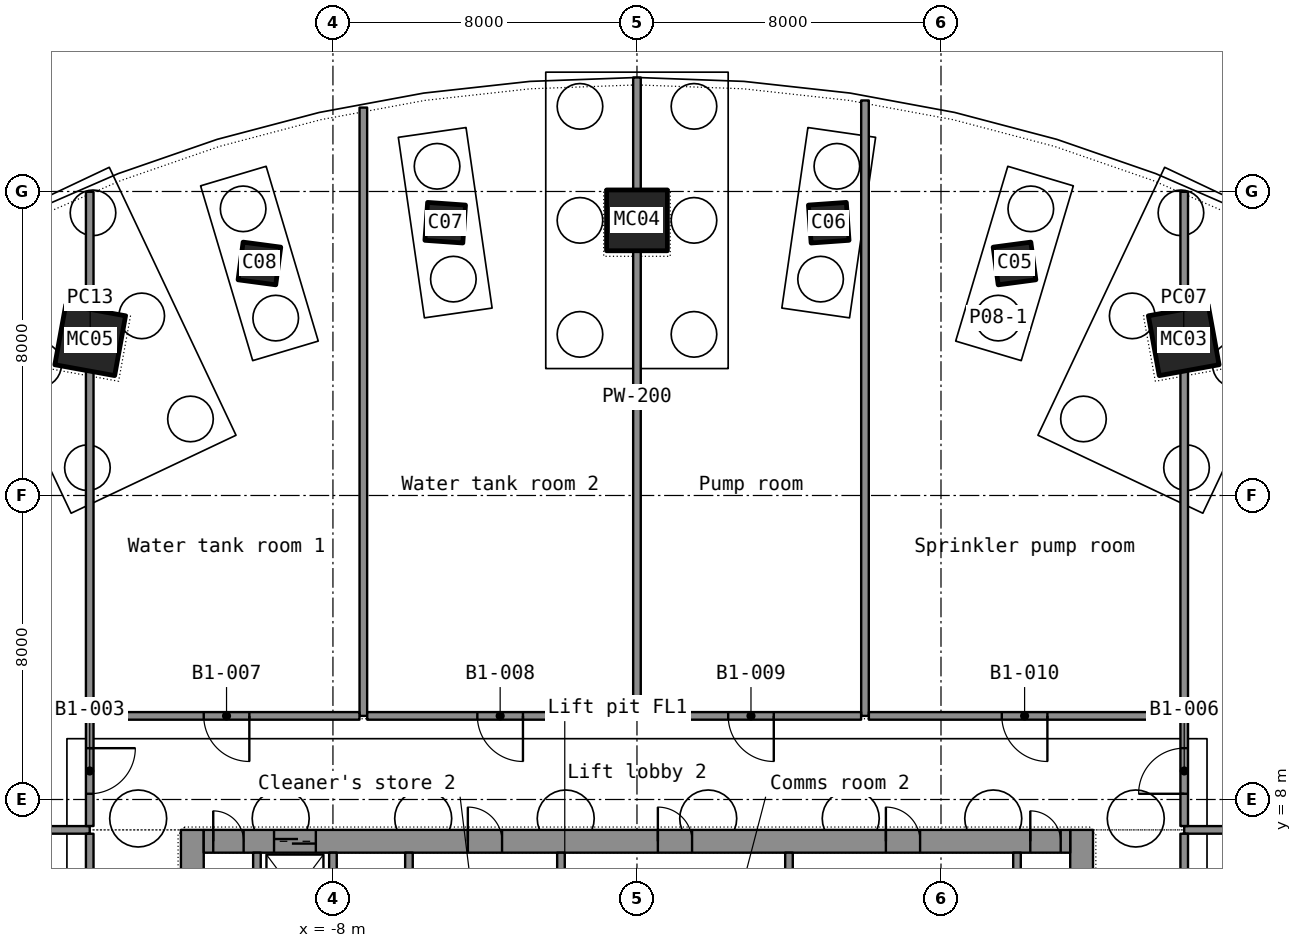
"""IFC4 building model, lengths in metres.
Left out: names, types, materials, properties, quantities, classifications, styles, units other than length and angle.
Written with IfcOpenShell. Run it as: python <this file> out.ifc"""

import sys

from ifc_helpers import new_model, si_unit, direction, frame, frame_2d, origin, origin_2d, place, context, subcontext, project, spatial, rectangle, hollow_rectangle, extrude, element, fill, save


model = new_model("IFC4")
c1 = context("Model", 3, precision=1e-05, world=origin(), true_north=direction((0.0, 1.0)))
c2 = subcontext(c1, "Body", "Model", "MODEL_VIEW")
j1 = project(units=[si_unit("LENGTHUNIT", "METRE"), si_unit("PLANEANGLEUNIT", "RADIAN")], contexts=[c1])
p1 = place(None, origin())
s1 = spatial("IfcSite", under=j1, at=p1, CompositionType="ELEMENT")
p2 = place(p1, origin())
s2 = spatial("IfcBuilding", under=s1, at=p2, CompositionType="ELEMENT")
p3 = place(p2, frame((0.0, 0.0, -5.0)))
s3 = spatial("IfcBuildingStorey", under=s2, at=p3, CompositionType="ELEMENT", Elevation=-5.0)
p4 = place(p3, frame((14.387, 20.085, 0.0), z_axis=(-0.017326178, -0.02450068, 0.999549659), x_axis=(0.906542435, -0.422080558, 0.005368072)))
e1 = element("IfcColumn", 1, at=p4, inside=s3, PredefinedType="COLUMN", context=c2, shape_type="SweptSolid", body=[
    extrude(hollow_rectangle(XDim=1.6, YDim=1.6, WallThickness=0.04, at=origin_2d()), origin(), (0.0, 0.0, 1.0), 5.002),
])
p5 = place(p3, frame((9.935, 22.106, 0.0), z_axis=(-0.011860186, -0.026648812, 0.999574498), x_axis=(0.959327102, -0.282270497, 0.003857265)))
e2 = element("IfcColumn", 2, at=p5, inside=s3, PredefinedType="COLUMN", context=c2, shape_type="SweptSolid", body=[
    extrude(hollow_rectangle(XDim=1.0, YDim=1.0, WallThickness=0.032, at=origin_2d()), origin(), (0.0, 0.0, 1.0), 5.002),
])
p6 = place(p3, frame((5.046, 23.179, 0.0), z_axis=(-0.00600341, -0.027918297, 0.999592181), x_axis=(0.990084374, -0.140459386, 0.002023321)))
e3 = element("IfcColumn", 3, at=p6, inside=s3, PredefinedType="COLUMN", context=c2, shape_type="SweptSolid", body=[
    extrude(hollow_rectangle(XDim=1.0, YDim=1.0, WallThickness=0.032, at=origin_2d()), origin(), (0.0, 0.0, 1.0), 5.002),
])
p7 = place(p3, frame((0.0, 23.24, 0.0), z_axis=(0.0, -0.028357732, 0.999597839), x_axis=(1.0, 0.0, 0.0)))
e4 = element("IfcColumn", 4, at=p7, inside=s3, PredefinedType="COLUMN", context=c2, shape_type="SweptSolid", body=[
    extrude(hollow_rectangle(XDim=1.6, YDim=1.6, WallThickness=0.04, at=origin_2d()), origin(), (0.0, 0.0, 1.0), 5.002),
])
p8 = place(p3, frame((-5.046, 23.179, 0.0), z_axis=(0.00600341, -0.027918297, 0.999592181), x_axis=(0.990084374, 0.140459386, -0.002023321)))
e5 = element("IfcColumn", 5, at=p8, inside=s3, PredefinedType="COLUMN", context=c2, shape_type="SweptSolid", body=[
    extrude(hollow_rectangle(XDim=1.0, YDim=1.0, WallThickness=0.032, at=origin_2d()), origin(), (0.0, 0.0, 1.0), 5.002),
])
p9 = place(p3, frame((-9.935, 22.106, 0.0), z_axis=(0.011860186, -0.026648812, 0.999574498), x_axis=(0.959327102, 0.282270497, -0.003857265)))
e6 = element("IfcColumn", 6, at=p9, inside=s3, PredefinedType="COLUMN", context=c2, shape_type="SweptSolid", body=[
    extrude(hollow_rectangle(XDim=1.0, YDim=1.0, WallThickness=0.032, at=origin_2d()), origin(), (0.0, 0.0, 1.0), 5.002),
])
p10 = place(p3, frame((-14.387, 20.085, 0.0), z_axis=(0.017326178, -0.02450068, 0.999549659), x_axis=(0.906542435, 0.422080558, -0.005368072)))
e7 = element("IfcColumn", 7, at=p10, inside=s3, PredefinedType="COLUMN", context=c2, shape_type="SweptSolid", body=[
    extrude(hollow_rectangle(XDim=1.6, YDim=1.6, WallThickness=0.04, at=origin_2d()), origin(), (0.0, 0.0, 1.0), 5.002),
])
p11 = place(p3, frame((-11.7, -7.2, 0.0), z_axis=(0.0, 0.0, 1.0), x_axis=(0.0, 1.0, 0.0)))
e8 = element("IfcWall", 8, at=p11, inside=s3, PredefinedType="SHEAR", context=c2, shape_type="SweptSolid", body=[
    extrude(rectangle(XDim=14.4, YDim=0.6, at=frame_2d((7.2, 0.0))), origin(), (0.0, 0.0, 1.0), 4.6),
])
p12 = place(p11, frame((6.5, 0.0, 0.0)))
e9 = element("IfcOpeningElement", 9, at=p12, cuts=e8, PredefinedType="OPENING", context=c2, shape_type="SweptSolid", body=[
    extrude(rectangle(XDim=1.4, YDim=2.2, at=frame_2d((0.7, 1.1))), frame((0.0, 0.31, 0.0), z_axis=(0.0, -1.0, 0.0), x_axis=(1.0, 0.0, 0.0)), (0.0, 0.0, 1.0), 0.62),
])
p13 = place(p3, frame((11.7, -7.2, 0.0), z_axis=(0.0, 0.0, 1.0), x_axis=(0.0, 1.0, 0.0)))
e10 = element("IfcWall", 10, at=p13, inside=s3, PredefinedType="SHEAR", context=c2, shape_type="SweptSolid", body=[
    extrude(rectangle(XDim=14.4, YDim=0.6, at=frame_2d((7.2, 0.0))), origin(), (0.0, 0.0, 1.0), 4.6),
])
p14 = place(p13, frame((6.5, 0.0, 0.0)))
e11 = element("IfcOpeningElement", 11, at=p14, cuts=e10, PredefinedType="OPENING", context=c2, shape_type="SweptSolid", body=[
    extrude(rectangle(XDim=1.4, YDim=2.2, at=frame_2d((0.7, 1.1))), frame((0.0, 0.31, 0.0), z_axis=(0.0, -1.0, 0.0), x_axis=(1.0, 0.0, 0.0)), (0.0, 0.0, 1.0), 0.62),
])
p15 = place(p3, frame((-11.4, 6.9, 0.0), z_axis=(0.0, 0.0, 1.0), x_axis=(1.0, 0.0, 0.0)))
e12 = element("IfcWall", 12, at=p15, inside=s3, PredefinedType="SHEAR", context=c2, shape_type="SweptSolid", body=[
    extrude(rectangle(XDim=22.8, YDim=0.6, at=frame_2d((11.4, 0.0))), origin(), (0.0, 0.0, 1.0), 4.6),
])
p16 = place(p15, frame((1.85, 0.0, 0.0)))
e13 = element("IfcOpeningElement", 13, at=p16, cuts=e12, PredefinedType="OPENING", context=c2, shape_type="SweptSolid", body=[
    extrude(rectangle(XDim=1.1, YDim=2.2, at=frame_2d((0.55, 1.1))), frame((0.0, 0.31, 0.0), z_axis=(0.0, -1.0, 0.0), x_axis=(1.0, 0.0, 0.0)), (0.0, 0.0, 1.0), 0.62),
])
p17 = place(p15, frame((6.95, 0.0, 0.0)))
e14 = element("IfcOpeningElement", 14, at=p17, cuts=e12, PredefinedType="OPENING", context=c2, shape_type="SweptSolid", body=[
    extrude(rectangle(XDim=0.9, YDim=2.1, at=frame_2d((0.45, 1.05))), frame((0.0, 0.31, 0.0), z_axis=(0.0, -1.0, 0.0), x_axis=(1.0, 0.0, 0.0)), (0.0, 0.0, 1.0), 0.62),
])
p18 = place(p15, frame((11.95, 0.0, 0.0)))
e15 = element("IfcOpeningElement", 15, at=p18, cuts=e12, PredefinedType="OPENING", context=c2, shape_type="SweptSolid", body=[
    extrude(rectangle(XDim=0.9, YDim=2.1, at=frame_2d((0.45, 1.05))), frame((0.0, 0.31, 0.0), z_axis=(0.0, -1.0, 0.0), x_axis=(1.0, 0.0, 0.0)), (0.0, 0.0, 1.0), 0.62),
])
p19 = place(p15, frame((17.95, 0.0, 0.0)))
e16 = element("IfcOpeningElement", 16, at=p19, cuts=e12, PredefinedType="OPENING", context=c2, shape_type="SweptSolid", body=[
    extrude(rectangle(XDim=0.9, YDim=2.1, at=frame_2d((0.45, 1.05))), frame((0.0, 0.31, 0.0), z_axis=(0.0, -1.0, 0.0), x_axis=(1.0, 0.0, 0.0)), (0.0, 0.0, 1.0), 0.62),
])
p20 = place(p15, frame((0.25, 0.0, 0.0)))
e17 = element("IfcOpeningElement", 17, at=p20, cuts=e12, PredefinedType="OPENING", context=c2, shape_type="SweptSolid", body=[
    extrude(rectangle(XDim=0.8, YDim=2.05, at=frame_2d((0.4, 1.025))), frame((0.0, 0.31, 0.0), z_axis=(0.0, -1.0, 0.0), x_axis=(1.0, 0.0, 0.0)), (0.0, 0.0, 1.0), 0.62),
])
p21 = place(p15, frame((21.75, 0.0, 0.0)))
e18 = element("IfcOpeningElement", 18, at=p21, cuts=e12, PredefinedType="OPENING", context=c2, shape_type="SweptSolid", body=[
    extrude(rectangle(XDim=0.8, YDim=2.05, at=frame_2d((0.4, 1.025))), frame((0.0, 0.31, 0.0), z_axis=(0.0, -1.0, 0.0), x_axis=(1.0, 0.0, 0.0)), (0.0, 0.0, 1.0), 0.62),
])
for number, where, z_axis, x_axis in (
    (19, (-10.0, 3.9, 0.0), (0.0, 0.0, 1.0), (0.0, 1.0, 0.0)),
    (20, (-8.0, 3.9, 0.0), (0.0, 0.0, 1.0), (0.0, 1.0, 0.0)),
    (21, (-6.0, 3.9, 0.0), (0.0, 0.0, 1.0), (0.0, 1.0, 0.0)),
    (22, (10.0, 3.9, 0.0), (0.0, 0.0, 1.0), (0.0, 1.0, 0.0)),
):
    element("IfcWall", number, at=place(p3, frame(where, z_axis=z_axis, x_axis=x_axis)), inside=s3, PredefinedType="SHEAR", context=c2, shape_type="SweptSolid", body=[
        extrude(rectangle(XDim=2.7, YDim=0.2, at=frame_2d((1.35, 0.0))), origin(), (0.0, 0.0, 1.0), 4.6),
    ])
for number, where, z_axis, x_axis in (
    (23, (-2.0, 3.9, 0.0), (0.0, 0.0, 1.0), (0.0, 1.0, 0.0)),
    (24, (4.0, 3.9, 0.0), (0.0, 0.0, 1.0), (0.0, 1.0, 0.0)),
):
    element("IfcWall", number, at=place(p3, frame(where, z_axis=z_axis, x_axis=x_axis)), inside=s3, PredefinedType="PARTITIONING", context=c2, shape_type="SweptSolid", body=[
        extrude(rectangle(XDim=2.7, YDim=0.2, at=frame_2d((1.35, 0.0))), origin(), (0.0, 0.0, 1.0), 4.6),
    ])
p22 = place(p3, frame((0.0, 10.2, 0.0), z_axis=(0.0, 0.0, 1.0), x_axis=(0.0, 1.0, 0.0)))
e25 = element("IfcWall", 25, at=p22, inside=s3, PredefinedType="PARTITIONING", context=c2, shape_type="SweptSolid", body=[
    extrude(rectangle(XDim=16.8, YDim=0.2, at=frame_2d((8.4, 0.0))), origin(), (0.0, 0.0, 1.0), 3.6),
])
for number, where, z_axis, x_axis in (
    (26, (-14.4, 7.2, 0.0), (0.0, 0.0, 1.0), (-1.0, 0.0, 0.0)),
    (27, (31.1, 7.2, 0.0), (0.0, 0.0, 1.0), (-1.0, 0.0, 0.0)),
):
    element("IfcWall", number, at=place(p3, frame(where, z_axis=z_axis, x_axis=x_axis)), inside=s3, PredefinedType="PARTITIONING", context=c2, shape_type="SweptSolid", body=[
        extrude(rectangle(XDim=16.7, YDim=0.2, at=frame_2d((8.35, 0.0))), origin(), (0.0, 0.0, 1.0), 3.6),
    ])
p23 = place(p3, frame((6.0, 10.2, 0.0), z_axis=(0.0, 0.0, 1.0), x_axis=(0.0, 1.0, 0.0)))
e28 = element("IfcWall", 28, at=p23, inside=s3, PredefinedType="PARTITIONING", context=c2, shape_type="SweptSolid", body=[
    extrude(rectangle(XDim=16.196, YDim=0.2, at=frame_2d((8.098, 0.0))), origin(), (0.0, 0.0, 1.0), 3.6),
])
p24 = place(p3, frame((-7.2, 10.2, 0.0), z_axis=(0.0, 0.0, 1.0), x_axis=(0.0, 1.0, 0.0)))
e29 = element("IfcWall", 29, at=p24, inside=s3, PredefinedType="PARTITIONING", context=c2, shape_type="SweptSolid", body=[
    extrude(rectangle(XDim=16.008, YDim=0.2, at=frame_2d((8.004, 0.0))), origin(), (0.0, 0.0, 1.0), 3.6),
])
p25 = place(p3, frame((-14.4, 7.098, 0.0), z_axis=(0.0, 0.0, 1.0), x_axis=(0.0, -1.0, 0.0)))
e30 = element("IfcWall", 30, at=p25, inside=s3, PredefinedType="PARTITIONING", context=c2, shape_type="SweptSolid", body=[
    extrude(rectangle(XDim=14.196, YDim=0.2, at=frame_2d((7.098, 0.0))), origin(), (0.0, 0.0, 1.0), 3.6),
])
p26 = place(p25, frame((6.498, 0.0, 0.0)))
e31 = element("IfcOpeningElement", 31, at=p26, cuts=e30, PredefinedType="OPENING", context=c2, shape_type="SweptSolid", body=[
    extrude(rectangle(XDim=1.2, YDim=2.2, at=frame_2d((0.6, 1.1))), frame((0.0, 0.11, 0.0), z_axis=(0.0, -1.0, 0.0), x_axis=(1.0, 0.0, 0.0)), (0.0, 0.0, 1.0), 0.22),
])
p27 = place(p3, frame((14.4, -7.098, 0.0), z_axis=(0.0, 0.0, 1.0), x_axis=(0.0, 1.0, 0.0)))
e32 = element("IfcWall", 32, at=p27, inside=s3, PredefinedType="PARTITIONING", context=c2, shape_type="SweptSolid", body=[
    extrude(rectangle(XDim=14.196, YDim=0.2, at=frame_2d((7.098, 0.0))), origin(), (0.0, 0.0, 1.0), 3.6),
])
p28 = place(p27, frame((6.498, 0.0, 0.0)))
e33 = element("IfcOpeningElement", 33, at=p28, cuts=e32, PredefinedType="OPENING", context=c2, shape_type="SweptSolid", body=[
    extrude(rectangle(XDim=1.2, YDim=2.2, at=frame_2d((0.6, 1.1))), frame((0.0, 0.11, 0.0), z_axis=(0.0, -1.0, 0.0), x_axis=(1.0, 0.0, 0.0)), (0.0, 0.0, 1.0), 0.22),
])
for number, where, z_axis, x_axis in (
    (34, (-14.4, 10.2, 0.0), (0.0, 0.0, 1.0), (0.0, 1.0, 0.0)),
    (35, (14.4, 23.991, 0.0), (0.0, 0.0, 1.0), (0.0, -1.0, 0.0)),
):
    element("IfcWall", number, at=place(p3, frame(where, z_axis=z_axis, x_axis=x_axis)), inside=s3, PredefinedType="PARTITIONING", context=c2, shape_type="SweptSolid", body=[
        extrude(rectangle(XDim=13.791, YDim=0.2, at=frame_2d((6.896, 0.0))), origin(), (0.0, 0.0, 1.0), 3.6),
    ])
p29 = place(p3, frame((14.298, 10.2, 0.0), z_axis=(0.0, 0.0, 1.0), x_axis=(-1.0, 0.0, 0.0)))
e36 = element("IfcWall", 36, at=p29, inside=s3, PredefinedType="PARTITIONING", context=c2, shape_type="SweptSolid", body=[
    extrude(rectangle(XDim=8.196, YDim=0.2, at=frame_2d((4.098, 0.0))), origin(), (0.0, 0.0, 1.0), 3.6),
])
p30 = place(p29, frame((3.498, 0.0, 0.0)))
e37 = element("IfcOpeningElement", 37, at=p30, cuts=e36, PredefinedType="OPENING", context=c2, shape_type="SweptSolid", body=[
    extrude(rectangle(XDim=1.2, YDim=2.2, at=frame_2d((0.6, 1.1))), frame((0.0, 0.11, 0.0), z_axis=(0.0, -1.0, 0.0), x_axis=(1.0, 0.0, 0.0)), (0.0, 0.0, 1.0), 0.22),
])
p31 = place(p3, frame((-7.302, 10.2, 0.0), z_axis=(0.0, 0.0, 1.0), x_axis=(-1.0, 0.0, 0.0)))
e38 = element("IfcWall", 38, at=p31, inside=s3, PredefinedType="PARTITIONING", context=c2, shape_type="SweptSolid", body=[
    extrude(rectangle(XDim=6.996, YDim=0.2, at=frame_2d((3.498, 0.0))), origin(), (0.0, 0.0, 1.0), 3.6),
])
p32 = place(p31, frame((2.898, 0.0, 0.0)))
e39 = element("IfcOpeningElement", 39, at=p32, cuts=e38, PredefinedType="OPENING", context=c2, shape_type="SweptSolid", body=[
    extrude(rectangle(XDim=1.2, YDim=2.2, at=frame_2d((0.6, 1.1))), frame((0.0, 0.11, 0.0), z_axis=(0.0, -1.0, 0.0), x_axis=(1.0, 0.0, 0.0)), (0.0, 0.0, 1.0), 0.22),
])
p33 = place(p3, frame((-0.102, 10.2, 0.0), z_axis=(0.0, 0.0, 1.0), x_axis=(-1.0, 0.0, 0.0)))
e40 = element("IfcWall", 40, at=p33, inside=s3, PredefinedType="PARTITIONING", context=c2, shape_type="SweptSolid", body=[
    extrude(rectangle(XDim=6.996, YDim=0.2, at=frame_2d((3.498, 0.0))), origin(), (0.0, 0.0, 1.0), 3.6),
])
p34 = place(p33, frame((2.898, 0.0, 0.0)))
e41 = element("IfcOpeningElement", 41, at=p34, cuts=e40, PredefinedType="OPENING", context=c2, shape_type="SweptSolid", body=[
    extrude(rectangle(XDim=1.2, YDim=2.2, at=frame_2d((0.6, 1.1))), frame((0.0, 0.11, 0.0), z_axis=(0.0, -1.0, 0.0), x_axis=(1.0, 0.0, 0.0)), (0.0, 0.0, 1.0), 0.22),
])
p35 = place(p3, frame((5.898, 10.2, 0.0), z_axis=(0.0, 0.0, 1.0), x_axis=(-1.0, 0.0, 0.0)))
e42 = element("IfcWall", 42, at=p35, inside=s3, PredefinedType="PARTITIONING", context=c2, shape_type="SweptSolid", body=[
    extrude(rectangle(XDim=5.796, YDim=0.2, at=frame_2d((2.898, 0.0))), origin(), (0.0, 0.0, 1.0), 3.6),
])
p36 = place(p35, frame((2.298, 0.0, 0.0)))
e43 = element("IfcOpeningElement", 43, at=p36, cuts=e42, PredefinedType="OPENING", context=c2, shape_type="SweptSolid", body=[
    extrude(rectangle(XDim=1.2, YDim=2.2, at=frame_2d((0.6, 1.1))), frame((0.0, 0.11, 0.0), z_axis=(0.0, -1.0, 0.0), x_axis=(1.0, 0.0, 0.0)), (0.0, 0.0, 1.0), 0.22),
])
p37 = place(p3, frame((-14.4, 10.199, 0.0), z_axis=(0.0, 0.0, 1.0), x_axis=(0.0, -1.0, 0.0)))
e44 = element("IfcWall", 44, at=p37, inside=s3, PredefinedType="PARTITIONING", context=c2, shape_type="SweptSolid", body=[
    extrude(rectangle(XDim=2.897, YDim=0.2, at=frame_2d((1.448, 0.0))), origin(), (0.0, 0.0, 1.0), 3.6),
])
p38 = place(p37, frame((0.848, 0.0, 0.0)))
e45 = element("IfcOpeningElement", 45, at=p38, cuts=e44, PredefinedType="OPENING", context=c2, shape_type="SweptSolid", body=[
    extrude(rectangle(XDim=1.2, YDim=2.2, at=frame_2d((0.6, 1.1))), frame((0.0, 0.11, 0.0), z_axis=(0.0, -1.0, 0.0), x_axis=(1.0, 0.0, 0.0)), (0.0, 0.0, 1.0), 0.22),
])
p39 = place(p3, frame((14.4, 7.302, 0.0), z_axis=(0.0, 0.0, 1.0), x_axis=(0.0, 1.0, 0.0)))
e46 = element("IfcWall", 46, at=p39, inside=s3, PredefinedType="PARTITIONING", context=c2, shape_type="SweptSolid", body=[
    extrude(rectangle(XDim=2.897, YDim=0.2, at=frame_2d((1.448, 0.0))), origin(), (0.0, 0.0, 1.0), 3.6),
])
p40 = place(p39, frame((0.848, 0.0, 0.0)))
e47 = element("IfcOpeningElement", 47, at=p40, cuts=e46, PredefinedType="OPENING", context=c2, shape_type="SweptSolid", body=[
    extrude(rectangle(XDim=1.2, YDim=2.2, at=frame_2d((0.6, 1.1))), frame((0.0, 0.11, 0.0), z_axis=(0.0, -1.0, 0.0), x_axis=(1.0, 0.0, 0.0)), (0.0, 0.0, 1.0), 0.22),
])
p41 = place(p16, origin())
e48 = element("IfcDoor", 48, at=p41, inside=s3, OperationType="DOUBLE_DOOR_SLIDING", PredefinedType="DOOR", context=c2, shape_type="SweptSolid", body=[
    extrude(rectangle(XDim=1.1, YDim=2.2, at=frame_2d((0.55, 1.1))), frame((0.0, 0.025, 0.0), z_axis=(0.0, -1.0, 0.0), x_axis=(1.0, 0.0, 0.0)), (0.0, 0.0, 1.0), 0.05),
])
fill(e13, e48)
p42 = place(p17, origin())
e49 = element("IfcDoor", 49, at=p42, inside=s3, OperationType="SINGLE_SWING_LEFT", PredefinedType="DOOR", context=c2, shape_type="SweptSolid", body=[
    extrude(rectangle(XDim=0.9, YDim=2.1, at=frame_2d((0.45, 1.05))), frame((0.0, 0.025, 0.0), z_axis=(0.0, -1.0, 0.0), x_axis=(1.0, 0.0, 0.0)), (0.0, 0.0, 1.0), 0.05),
])
fill(e14, e49)
p43 = place(p18, origin())
e50 = element("IfcDoor", 50, at=p43, inside=s3, OperationType="SINGLE_SWING_LEFT", PredefinedType="DOOR", context=c2, shape_type="SweptSolid", body=[
    extrude(rectangle(XDim=0.9, YDim=2.1, at=frame_2d((0.45, 1.05))), frame((0.0, 0.025, 0.0), z_axis=(0.0, -1.0, 0.0), x_axis=(1.0, 0.0, 0.0)), (0.0, 0.0, 1.0), 0.05),
])
fill(e15, e50)
p44 = place(p19, origin())
e51 = element("IfcDoor", 51, at=p44, inside=s3, OperationType="SINGLE_SWING_LEFT", PredefinedType="DOOR", context=c2, shape_type="SweptSolid", body=[
    extrude(rectangle(XDim=0.9, YDim=2.1, at=frame_2d((0.45, 1.05))), frame((0.0, 0.025, 0.0), z_axis=(0.0, -1.0, 0.0), x_axis=(1.0, 0.0, 0.0)), (0.0, 0.0, 1.0), 0.05),
])
fill(e16, e51)
p45 = place(p20, origin())
e52 = element("IfcDoor", 52, at=p45, inside=s3, OperationType="SINGLE_SWING_LEFT", PredefinedType="DOOR", context=c2, shape_type="SweptSolid", body=[
    extrude(rectangle(XDim=0.8, YDim=2.05, at=frame_2d((0.4, 1.025))), frame((0.0, 0.025, 0.0), z_axis=(0.0, -1.0, 0.0), x_axis=(1.0, 0.0, 0.0)), (0.0, 0.0, 1.0), 0.05),
])
fill(e17, e52)
p46 = place(p21, origin())
e53 = element("IfcDoor", 53, at=p46, inside=s3, OperationType="SINGLE_SWING_LEFT", PredefinedType="DOOR", context=c2, shape_type="SweptSolid", body=[
    extrude(rectangle(XDim=0.8, YDim=2.05, at=frame_2d((0.4, 1.025))), frame((0.0, 0.025, 0.0), z_axis=(0.0, -1.0, 0.0), x_axis=(1.0, 0.0, 0.0)), (0.0, 0.0, 1.0), 0.05),
])
fill(e18, e53)
p47 = place(p38, origin())
e54 = element("IfcDoor", 54, at=p47, inside=s3, OperationType="DOUBLE_DOOR_SINGLE_SWING", PredefinedType="DOOR", context=c2, shape_type="SweptSolid", body=[
    extrude(rectangle(XDim=1.2, YDim=2.2, at=frame_2d((0.6, 1.1))), frame((0.0, 0.025, 0.0), z_axis=(0.0, -1.0, 0.0), x_axis=(1.0, 0.0, 0.0)), (0.0, 0.0, 1.0), 0.05),
])
fill(e45, e54)
p48 = place(p40, origin())
e55 = element("IfcDoor", 55, at=p48, inside=s3, OperationType="DOUBLE_DOOR_SINGLE_SWING", PredefinedType="DOOR", context=c2, shape_type="SweptSolid", body=[
    extrude(rectangle(XDim=1.2, YDim=2.2, at=frame_2d((0.6, 1.1))), frame((0.0, 0.025, 0.0), z_axis=(0.0, -1.0, 0.0), x_axis=(1.0, 0.0, 0.0)), (0.0, 0.0, 1.0), 0.05),
])
fill(e47, e55)
p49 = place(p32, origin())
e56 = element("IfcDoor", 56, at=p49, inside=s3, OperationType="DOUBLE_DOOR_SINGLE_SWING", PredefinedType="DOOR", context=c2, shape_type="SweptSolid", body=[
    extrude(rectangle(XDim=1.2, YDim=2.2, at=frame_2d((0.6, 1.1))), frame((0.0, 0.025, 0.0), z_axis=(0.0, -1.0, 0.0), x_axis=(1.0, 0.0, 0.0)), (0.0, 0.0, 1.0), 0.05),
])
fill(e39, e56)
p50 = place(p34, origin())
e57 = element("IfcDoor", 57, at=p50, inside=s3, OperationType="DOUBLE_DOOR_SINGLE_SWING", PredefinedType="DOOR", context=c2, shape_type="SweptSolid", body=[
    extrude(rectangle(XDim=1.2, YDim=2.2, at=frame_2d((0.6, 1.1))), frame((0.0, 0.025, 0.0), z_axis=(0.0, -1.0, 0.0), x_axis=(1.0, 0.0, 0.0)), (0.0, 0.0, 1.0), 0.05),
])
fill(e41, e57)
p51 = place(p36, origin())
e58 = element("IfcDoor", 58, at=p51, inside=s3, OperationType="DOUBLE_DOOR_SINGLE_SWING", PredefinedType="DOOR", context=c2, shape_type="SweptSolid", body=[
    extrude(rectangle(XDim=1.2, YDim=2.2, at=frame_2d((0.6, 1.1))), frame((0.0, 0.025, 0.0), z_axis=(0.0, -1.0, 0.0), x_axis=(1.0, 0.0, 0.0)), (0.0, 0.0, 1.0), 0.05),
])
fill(e43, e58)
p52 = place(p30, origin())
e59 = element("IfcDoor", 59, at=p52, inside=s3, OperationType="DOUBLE_DOOR_SINGLE_SWING", PredefinedType="DOOR", context=c2, shape_type="SweptSolid", body=[
    extrude(rectangle(XDim=1.2, YDim=2.2, at=frame_2d((0.6, 1.1))), frame((0.0, 0.025, 0.0), z_axis=(0.0, -1.0, 0.0), x_axis=(1.0, 0.0, 0.0)), (0.0, 0.0, 1.0), 0.05),
])
fill(e37, e59)
save(model, sys.argv[1])
